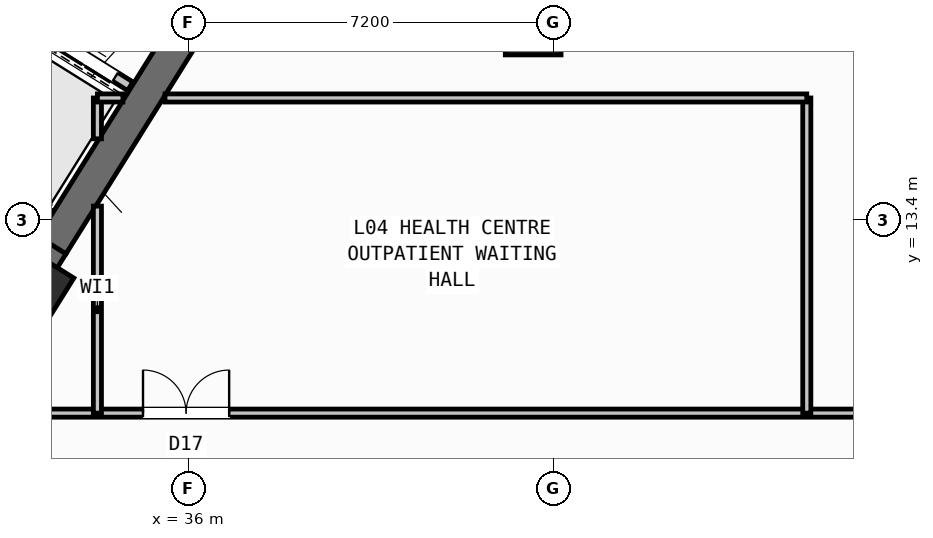
"""IFC4 building model, lengths in metres.
Left out: names, types, materials, properties, quantities, classifications, styles, units other than length and angle.
Written with IfcOpenShell. Run it as: python <this file> out.ifc"""

import sys

from ifc_helpers import new_model, si_unit, direction, frame, frame_2d, origin, origin_2d, place, context, subcontext, project, spatial, rectangle, hollow_rectangle, extrude, source, transform, mapped, element, fill, save


model = new_model("IFC4")
c1 = context("Model", 3, precision=1e-05, world=origin(), true_north=direction((0.0, 1.0)))
c2 = subcontext(c1, "Body", "Model", "MODEL_VIEW")
j1 = project(units=[si_unit("LENGTHUNIT", "METRE"), si_unit("PLANEANGLEUNIT", "RADIAN")], contexts=[c1])
p1 = place(None, origin())
s1 = spatial("IfcSite", under=j1, at=p1, CompositionType="ELEMENT")
p2 = place(p1, origin())
s2 = spatial("IfcBuilding", under=s1, at=p2, CompositionType="ELEMENT")
p3 = place(p2, frame((0.0, 0.0, 18.6)))
s3 = spatial("IfcBuildingStorey", under=s2, at=p3, CompositionType="ELEMENT", Elevation=18.6)
p4 = place(p3, frame((33.409, 12.45, 0.0), z_axis=(0.0, 0.0, 1.0), x_axis=(-0.848051132073, 0.529914405721, 0.0)))
e1 = element("IfcWall", 1, at=p4, inside=s3, PredefinedType="SHEAR", context=c2, shape_type="SweptSolid", body=[
    extrude(rectangle(XDim=13.24, YDim=0.65, at=frame_2d((6.62, 0.0))), origin(), (0.0, 0.0, 1.0), 4.95),
])
p5 = place(p3, frame((36.683, 18.304, 0.0), z_axis=(0.0, 0.0, 1.0), x_axis=(-0.529899109053, -0.848060690178, 0.0)))
e2 = element("IfcWall", 2, at=p5, inside=s3, PredefinedType="SHEAR", context=c2, shape_type="SweptSolid", body=[
    extrude(rectangle(XDim=6.375, YDim=0.65, at=frame_2d((3.188, 0.0))), origin(), (0.0, 0.0, 1.0), 4.95),
])
m1 = source(origin(), c2, "Body", "SweptSolid", [
    extrude(hollow_rectangle(XDim=1.1, YDim=1.1, WallThickness=0.04, at=origin_2d()), origin(), (0.0, 0.0, 1.0), 5.4),
])
p6 = place(p3, frame((42.8, 17.2, 0.0), z_axis=(0.0, 0.0, 1.0), x_axis=(1.0, 0.0, 0.0)))
e3 = element("IfcColumn", 3, at=p6, inside=s3, PredefinedType="COLUMN", context=c2, shape_type="MappedRepresentation", body=[
    mapped(m1, transform((0.0, 0.0, 0.0), scale=1.0)),
])
m2 = source(origin(), c2, "Body", "SweptSolid", [
    extrude(hollow_rectangle(XDim=1.0, YDim=1.0, WallThickness=0.04, at=origin_2d()), origin(), (0.0, 0.0, 1.0), 5.4),
])
p7 = place(p3, frame((33.046, 12.087, 0.0), z_axis=(0.0, 0.0, 1.0), x_axis=(-0.848048096156, 0.529919264233, 0.0)))
e4 = element("IfcColumn", 4, at=p7, inside=s3, PredefinedType="COLUMN", context=c2, shape_type="MappedRepresentation", body=[
    mapped(m2, transform((0.0, 0.0, 0.0), scale=1.0)),
])
p8 = place(p3, frame((34.848, 16.031, 0.0), z_axis=(0.0, 0.0, 1.0), x_axis=(-0.848044042236, 0.529925751807, 0.0)))
e5 = element("IfcWall", 5, at=p8, inside=s3, PredefinedType="STANDARD", context=c2, shape_type="SweptSolid", body=[
    extrude(rectangle(XDim=4.198, YDim=0.2, at=frame_2d((2.099, 0.0))), origin(), (0.0, 0.0, 1.0), 4.94),
])
p9 = place(p8, frame((0.348, 0.0, 0.0)))
e6 = element("IfcOpeningElement", 6, at=p9, cuts=e5, PredefinedType="OPENING", context=c2, shape_type="SweptSolid", body=[
    extrude(rectangle(XDim=1.3, YDim=2.2, at=frame_2d((0.65, 1.1))), frame((0.0, 0.11, 0.0), z_axis=(0.0, -1.0, 0.0), x_axis=(1.0, 0.0, 0.0)), (0.0, 0.0, 1.0), 0.22),
])
p10 = place(p8, frame((2.423, 0.0, 0.0)))
e7 = element("IfcOpeningElement", 7, at=p10, cuts=e5, PredefinedType="OPENING", context=c2, shape_type="SweptSolid", body=[
    extrude(rectangle(XDim=1.45, YDim=2.25, at=frame_2d((0.725, 1.125))), frame((0.0, 0.11, 0.0), z_axis=(0.0, -1.0, 0.0), x_axis=(1.0, 0.0, 0.0)), (0.0, 0.0, 1.0), 0.22),
])
p11 = place(p3, frame((50.119, 16.333, 0.0), z_axis=(0.0, 0.0, 1.0), x_axis=(-0.587749856981, 0.809042709391, 0.0)))
e8 = element("IfcWall", 8, at=p11, inside=s3, PredefinedType="STANDARD", context=c2, shape_type="SweptSolid", body=[
    extrude(rectangle(XDim=2.96, YDim=0.2, at=frame_2d((1.48, 0.0))), origin(), (0.0, 0.0, 1.0), 3.125),
])
p12 = place(p11, frame((0.65, 0.0, 0.0)))
e9 = element("IfcOpeningElement", 9, at=p12, cuts=e8, PredefinedType="OPENING", context=c2, shape_type="SweptSolid", body=[
    extrude(rectangle(XDim=1.5, YDim=2.15, at=frame_2d((0.75, 1.075))), frame((0.0, 0.11, 0.0), z_axis=(0.0, -1.0, 0.0), x_axis=(1.0, 0.0, 0.0)), (0.0, 0.0, 1.0), 0.22),
])
p13 = place(p3, frame((6.1, 9.58, 0.0), z_axis=(0.0, 0.0, 1.0), x_axis=(1.0, 0.0, 0.0)))
e10 = element("IfcWall", 10, at=p13, inside=s3, PredefinedType="PARTITIONING", context=c2, shape_type="SweptSolid", body=[
    extrude(rectangle(XDim=62.1, YDim=0.16, at=frame_2d((31.05, 0.0))), origin(), (0.0, 0.0, 1.0), 4.94),
])
p14 = place(p13, frame((29.0, 0.0, 0.0)))
e11 = element("IfcOpeningElement", 11, at=p14, cuts=e10, PredefinedType="OPENING", context=c2, shape_type="SweptSolid", body=[
    extrude(rectangle(XDim=1.7, YDim=2.2, at=frame_2d((0.85, 1.1))), frame((0.0, 0.09, 0.0), z_axis=(0.0, -1.0, 0.0), x_axis=(1.0, 0.0, 0.0)), (0.0, 0.0, 1.0), 0.18),
])
p15 = place(p13, frame((0.35, 0.0, 0.0)))
e12 = element("IfcOpeningElement", 12, at=p15, cuts=e10, PredefinedType="OPENING", context=c2, shape_type="SweptSolid", body=[
    extrude(rectangle(XDim=1.5, YDim=2.15, at=frame_2d((0.75, 1.075))), frame((0.0, 0.09, 0.0), z_axis=(0.0, -1.0, 0.0), x_axis=(1.0, 0.0, 0.0)), (0.0, 0.0, 1.0), 0.18),
])
p16 = place(p13, frame((5.2, 0.0, 0.0)))
e13 = element("IfcOpeningElement", 13, at=p16, cuts=e10, PredefinedType="OPENING", context=c2, shape_type="SweptSolid", body=[
    extrude(rectangle(XDim=1.08, YDim=2.15, at=frame_2d((0.54, 1.075))), frame((0.0, 0.09, 0.0), z_axis=(0.0, -1.0, 0.0), x_axis=(1.0, 0.0, 0.0)), (0.0, 0.0, 1.0), 0.18),
])
p17 = place(p13, frame((58.5, 0.0, 0.0)))
e14 = element("IfcOpeningElement", 14, at=p17, cuts=e10, PredefinedType="OPENING", context=c2, shape_type="SweptSolid", body=[
    extrude(rectangle(XDim=1.08, YDim=2.15, at=frame_2d((0.54, 1.075))), frame((0.0, 0.09, 0.0), z_axis=(0.0, -1.0, 0.0), x_axis=(1.0, 0.0, 0.0)), (0.0, 0.0, 1.0), 0.18),
])
p18 = place(p3, frame((34.2, 9.58, 0.0), z_axis=(0.0, 0.0, 1.0), x_axis=(0.0, 1.0, 0.0)))
e15 = element("IfcWall", 15, at=p18, inside=s3, PredefinedType="PARTITIONING", context=c2, shape_type="SweptSolid", body=[
    extrude(rectangle(XDim=4.085, YDim=0.16, at=frame_2d((2.043, 0.0))), origin(), (0.0, 0.0, 1.0), 4.94),
])
p19 = place(p3, frame((34.2, 14.994, 0.0), z_axis=(0.0, 0.0, 1.0), x_axis=(0.0, 1.0, 0.0)))
e16 = element("IfcWall", 16, at=p19, inside=s3, PredefinedType="PARTITIONING", context=c2, shape_type="SweptSolid", body=[
    extrude(rectangle(XDim=0.806, YDim=0.16, at=frame_2d((0.403, 0.0))), origin(), (0.0, 0.0, 1.0), 4.94),
])
p20 = place(p3, frame((48.2, 9.58, 0.0), z_axis=(0.0, 0.0, 1.0), x_axis=(0.0, 1.0, 0.0)))
e17 = element("IfcWall", 17, at=p20, inside=s3, PredefinedType="PARTITIONING", context=c2, shape_type="SweptSolid", body=[
    extrude(rectangle(XDim=6.22, YDim=0.16, at=frame_2d((3.11, 0.0))), origin(), (0.0, 0.0, 1.0), 4.94),
])
p21 = place(p3, frame((34.2, 15.8, 0.0), z_axis=(0.0, 0.0, 1.0), x_axis=(1.0, 0.0, 0.0)))
e18 = element("IfcWall", 18, at=p21, inside=s3, PredefinedType="PARTITIONING", context=c2, shape_type="SweptSolid", body=[
    extrude(rectangle(XDim=0.504, YDim=0.16, at=frame_2d((0.252, 0.0))), origin(), (0.0, 0.0, 1.0), 4.94),
])
p22 = place(p3, frame((35.534, 15.8, 0.0), z_axis=(0.0, 0.0, 1.0), x_axis=(1.0, 0.0, 0.0)))
e19 = element("IfcWall", 19, at=p22, inside=s3, PredefinedType="PARTITIONING", context=c2, shape_type="SweptSolid", body=[
    extrude(rectangle(XDim=12.666, YDim=0.16, at=frame_2d((6.333, 0.0))), origin(), (0.0, 0.0, 1.0), 4.94),
])
m3 = source(origin(), c2, "Body", "SweptSolid", [
    extrude(rectangle(XDim=1.3, YDim=2.2, at=frame_2d((0.65, 1.1))), frame((0.0, 0.025, 0.0), z_axis=(0.0, -1.0, 0.0), x_axis=(1.0, 0.0, 0.0)), (0.0, 0.0, 1.0), 0.05),
])
p23 = place(p9, origin())
e20 = element("IfcDoor", 20, at=p23, inside=s3, OperationType="DOUBLE_DOOR_SLIDING", PredefinedType="DOOR", context=c2, shape_type="MappedRepresentation", body=[
    mapped(m3, transform((0.0, 0.0, 0.0), scale=1.0)),
])
fill(e6, e20)
m4 = source(origin(), c2, "Body", "SweptSolid", [
    extrude(rectangle(XDim=1.7, YDim=2.2, at=frame_2d((0.85, 1.1))), frame((0.0, 0.025, 0.0), z_axis=(0.0, -1.0, 0.0), x_axis=(1.0, 0.0, 0.0)), (0.0, 0.0, 1.0), 0.05),
])
p24 = place(p14, origin())
e21 = element("IfcDoor", 21, at=p24, inside=s3, OperationType="DOUBLE_DOOR_SINGLE_SWING", PredefinedType="DOOR", context=c2, shape_type="MappedRepresentation", body=[
    mapped(m4, transform((0.0, 0.0, 0.0), scale=1.0)),
])
fill(e11, e21)
save(model, sys.argv[1])
